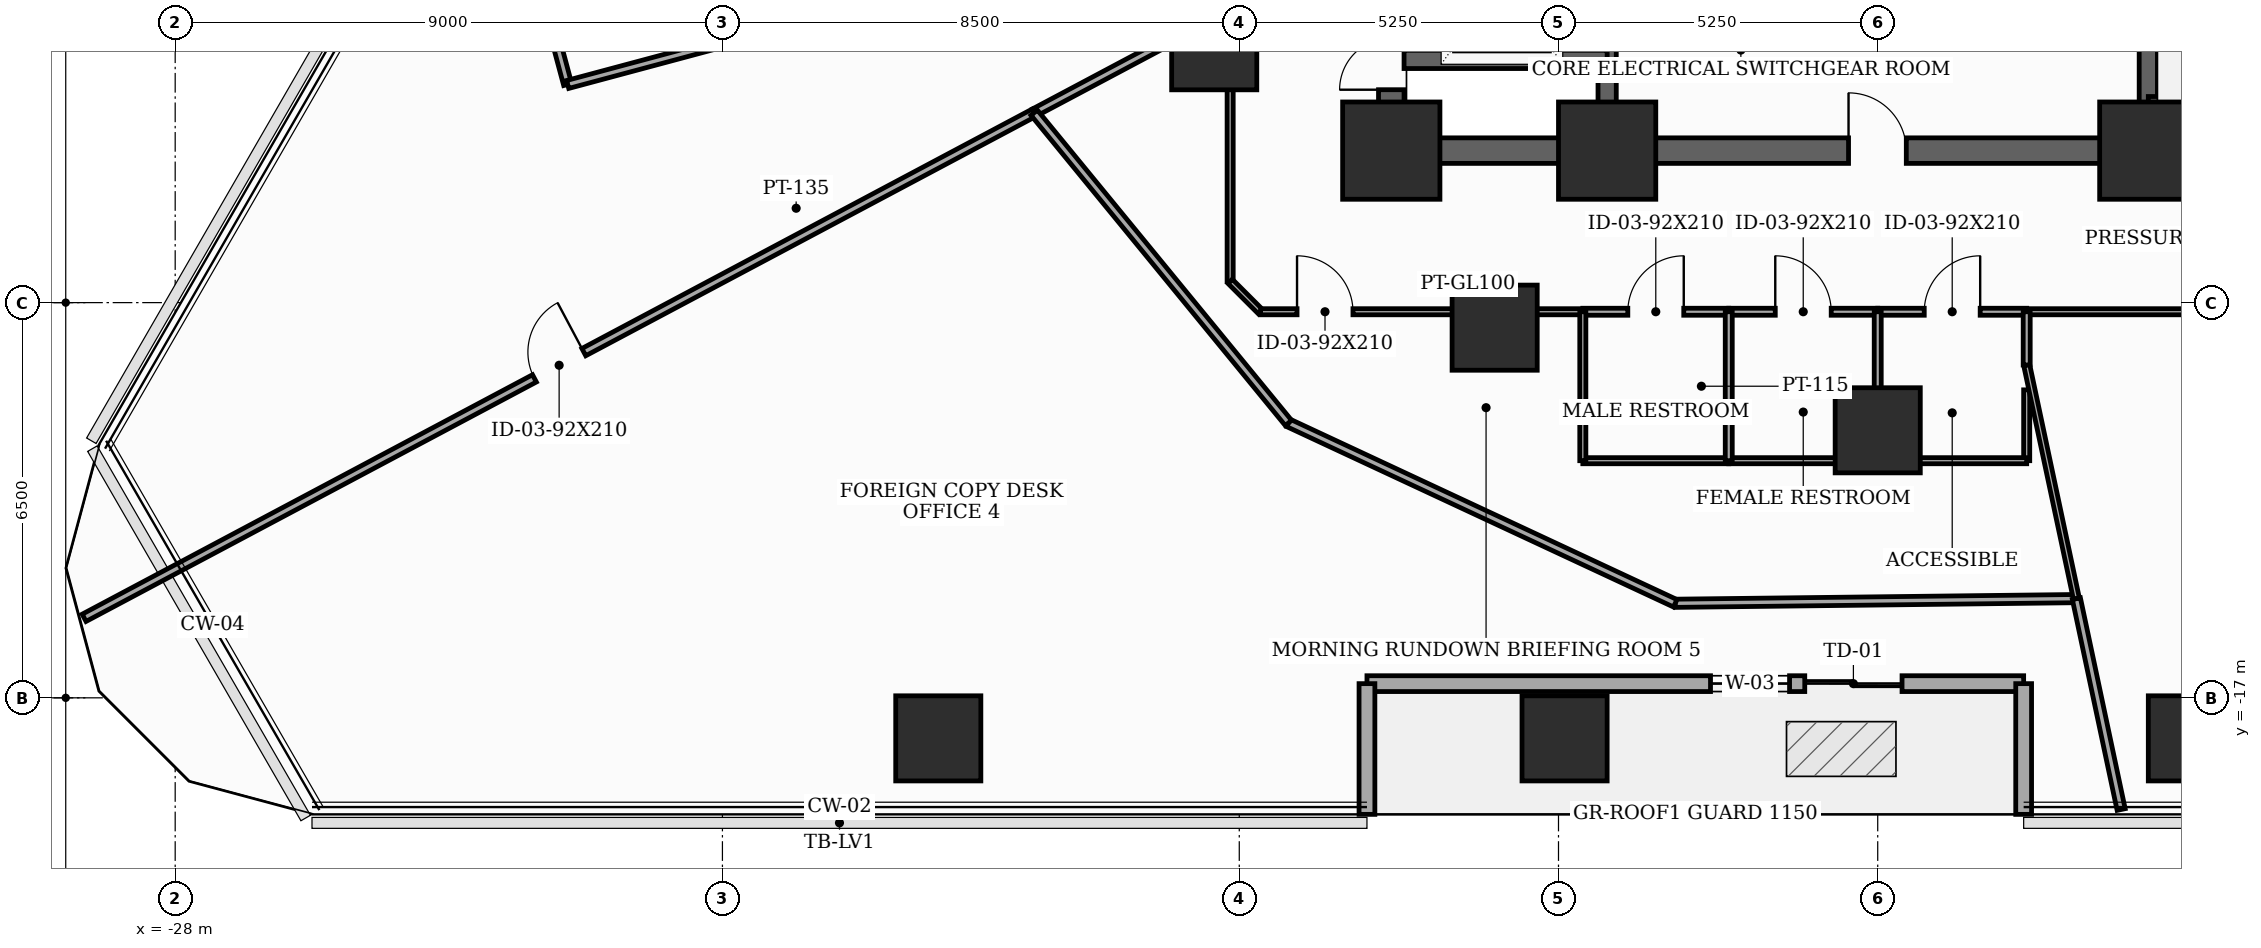
"""IFC4 building model, lengths in metres.
Left out: names, types, materials, properties, quantities, classifications, styles, units other than length and angle.
Written with IfcOpenShell. Run it as: python <this file> out.ifc"""

import sys

from ifc_helpers import new_model, si_unit, direction, frame, frame_2d, origin, origin_2d, place, context, subcontext, project, spatial, rectangle, extrude, element, fill, save


model = new_model("IFC4")
c1 = context("Model", 3, precision=1e-05, world=origin(), true_north=direction((0.0, 1.0)))
c2 = subcontext(c1, "Body", "Model", "MODEL_VIEW")
j1 = project(units=[si_unit("LENGTHUNIT", "METRE"), si_unit("PLANEANGLEUNIT", "RADIAN")], contexts=[c1])
p1 = place(None, origin())
s1 = spatial("IfcSite", under=j1, at=p1, CompositionType="ELEMENT")
p2 = place(p1, origin())
s2 = spatial("IfcBuilding", under=s1, at=p2, CompositionType="ELEMENT")
p3 = place(p2, frame((0.0, 0.0, 29.7)))
s3 = spatial("IfcBuildingStorey", under=s2, at=p3, CompositionType="ELEMENT", Elevation=29.7)
for number, where, z_axis, x_axis in (
    (1, (-8.0, -8.0, 0.0), (0.0, 0.0, 1.0), (1.0, 0.0, 0.0)),
    (2, (-4.45, -8.0, 0.0), (0.0, 0.0, 1.0), (1.0, 0.0, 0.0)),
    (3, (4.45, -8.0, 0.0), (0.0, 0.0, 1.0), (1.0, 0.0, 0.0)),
):
    element("IfcColumn", number, at=place(p3, frame(where, z_axis=z_axis, x_axis=x_axis)), inside=s3, PredefinedType="COLUMN", context=c2, shape_type="SweptSolid", body=[
        extrude(rectangle(XDim=1.6, YDim=1.6, at=origin_2d()), origin(), (0.0, 0.0, 1.0), 3.7),
    ])
for number, where, z_axis, x_axis in (
    (4, (-10.912, -6.3, 0.0), (0.0, 0.0, 1.0), (1.0, 0.0, 0.0)),
    (5, (-6.3, -10.912, 0.0), (0.0, 0.0, 1.0), (1.0, 0.0, 0.0)),
    (6, (0.0, -12.6, 0.0), (0.0, 0.0, 1.0), (1.0, 0.0, 0.0)),
    (7, (-15.45, -17.667, 0.0), (0.0, 0.0, 1.0), (1.0, 0.0, 0.0)),
    (8, (-5.15, -17.667, 0.0), (0.0, 0.0, 1.0), (1.0, 0.0, 0.0)),
    (9, (5.15, -17.667, 0.0), (0.0, 0.0, 1.0), (1.0, 0.0, 0.0)),
):
    element("IfcColumn", number, at=place(p3, frame(where, z_axis=z_axis, x_axis=x_axis)), inside=s3, PredefinedType="COLUMN", context=c2, shape_type="SweptSolid", body=[
        extrude(rectangle(XDim=1.4, YDim=1.4, at=origin_2d()), origin(), (0.0, 0.0, 1.0), 3.7),
    ])
p4 = place(p3, frame((-8.4, -16.767, 0.0), z_axis=(0.0, 0.0, 1.0), x_axis=(1.0, 0.0, 0.0)))
e10 = element("IfcWall", 10, at=p4, inside=s3, PredefinedType="SOLIDWALL", context=c2, shape_type="SweptSolid", body=[
    extrude(rectangle(XDim=10.8, YDim=0.26, at=frame_2d((5.4, 0.0))), origin(), (0.0, 0.0, 1.0), 3.5),
])
p5 = place(p4, frame((7.2, 0.0, 0.0)))
e11 = element("IfcOpeningElement", 11, at=p5, cuts=e10, PredefinedType="OPENING", context=c2, shape_type="SweptSolid", body=[
    extrude(rectangle(XDim=1.6, YDim=2.08, at=frame_2d((0.8, 1.04))), frame((0.0, 0.14, 0.0), z_axis=(0.0, -1.0, 0.0), x_axis=(1.0, 0.0, 0.0)), (0.0, 0.0, 1.0), 0.28),
])
p6 = place(p4, frame((5.65, 0.0, 0.85)))
e12 = element("IfcOpeningElement", 12, at=p6, cuts=e10, PredefinedType="OPENING", context=c2, shape_type="SweptSolid", body=[
    extrude(rectangle(XDim=1.3, YDim=1.25, at=frame_2d((0.65, 0.625))), frame((0.0, 0.14, 0.0), z_axis=(0.0, -1.0, 0.0), x_axis=(1.0, 0.0, 0.0)), (0.0, 0.0, 1.0), 0.28),
])
for number, where, z_axis, x_axis in (
    (13, (-8.4, -18.917, 0.0), (0.0, 0.0, 1.0), (0.0, 1.0, 0.0)),
    (14, (2.4, -16.767, 0.0), (0.0, 0.0, 1.0), (0.0, -1.0, 0.0)),
):
    element("IfcWall", number, at=place(p3, frame(where, z_axis=z_axis, x_axis=x_axis)), inside=s3, PredefinedType="SOLIDWALL", context=c2, shape_type="SweptSolid", body=[
        extrude(rectangle(XDim=2.15, YDim=0.26, at=frame_2d((1.075, 0.0))), origin(), (0.0, 0.0, 1.0), 3.5),
    ])
p7 = place(p3, frame((-8.0, -8.0, 0.0), z_axis=(0.0, 0.0, 1.0), x_axis=(0.0, 1.0, 0.0)))
e15 = element("IfcWall", 15, at=p7, inside=s3, PredefinedType="SHEAR", context=c2, shape_type="SweptSolid", body=[
    extrude(rectangle(XDim=16.0, YDim=0.42, at=frame_2d((8.0, 0.0))), origin(), (0.0, 0.0, 1.0), 3.5),
])
p8 = place(p7, frame((1.002, 0.0, 0.0)))
e16 = element("IfcOpeningElement", 16, at=p8, cuts=e15, PredefinedType="OPENING", context=c2, shape_type="SweptSolid", body=[
    extrude(rectangle(XDim=0.85, YDim=2.02, at=frame_2d((0.425, 1.01))), frame((0.0, 0.22, 0.0), z_axis=(0.0, -1.0, 0.0), x_axis=(1.0, 0.0, 0.0)), (0.0, 0.0, 1.0), 0.44),
])
p9 = place(p7, frame((5.35, 0.0, 0.0)))
e17 = element("IfcOpeningElement", 17, at=p9, cuts=e15, PredefinedType="OPENING", context=c2, shape_type="SweptSolid", body=[
    extrude(rectangle(XDim=1.05, YDim=2.15, at=frame_2d((0.525, 1.075))), frame((0.0, 0.22, 0.0), z_axis=(0.0, -1.0, 0.0), x_axis=(1.0, 0.0, 0.0)), (0.0, 0.0, 1.0), 0.44),
])
p10 = place(p3, frame((-8.0, -8.0, 0.0), z_axis=(0.0, 0.0, 1.0), x_axis=(1.0, 0.0, 0.0)))
e18 = element("IfcWall", 18, at=p10, inside=s3, PredefinedType="SHEAR", context=c2, shape_type="SweptSolid", body=[
    extrude(rectangle(XDim=16.0, YDim=0.42, at=frame_2d((8.0, 0.0))), origin(), (0.0, 0.0, 1.0), 3.5),
])
p11 = place(p10, frame((7.52, 0.0, 0.0)))
e19 = element("IfcOpeningElement", 19, at=p11, cuts=e18, PredefinedType="OPENING", context=c2, shape_type="SweptSolid", body=[
    extrude(rectangle(XDim=0.95, YDim=2.1, at=frame_2d((0.475, 1.05))), frame((0.0, 0.22, 0.0), z_axis=(0.0, -1.0, 0.0), x_axis=(1.0, 0.0, 0.0)), (0.0, 0.0, 1.0), 0.44),
])
for number, where, z_axis, x_axis in (
    (20, (-4.45, -7.79, 0.0), (0.0, 0.0, 1.0), (0.0, 1.0, 0.0)),
    (21, (4.45, -7.79, 0.0), (0.0, 0.0, 1.0), (0.0, 1.0, 0.0)),
):
    element("IfcWall", number, at=place(p3, frame(where, z_axis=z_axis, x_axis=x_axis)), inside=s3, PredefinedType="SHEAR", context=c2, shape_type="SweptSolid", body=[
        extrude(rectangle(XDim=15.58, YDim=0.3, at=frame_2d((7.79, 0.0))), origin(), (0.0, 0.0, 1.0), 3.5),
    ])
p12 = place(p3, frame((4.45, -7.26, 0.0), z_axis=(0.0, 0.0, 1.0), x_axis=(1.0, 0.0, 0.0)))
e22 = element("IfcWall", 22, at=p12, inside=s3, PredefinedType="SHEAR", context=c2, shape_type="SweptSolid", body=[
    extrude(rectangle(XDim=3.55, YDim=0.3, at=frame_2d((1.775, 0.0))), origin(), (0.0, 0.0, 1.0), 3.5),
])
p13 = place(p3, frame((-7.79, -6.5, 0.0), z_axis=(0.0, 0.0, 1.0), x_axis=(1.0, 0.0, 0.0)))
e23 = element("IfcWall", 23, at=p13, inside=s3, PredefinedType="SHEAR", context=c2, shape_type="SweptSolid", body=[
    extrude(rectangle(XDim=3.34, YDim=0.3, at=frame_2d((1.67, 0.0))), origin(), (0.0, 0.0, 1.0), 3.5),
])
p14 = place(p3, frame((-22.115, -4.787, 0.0), z_axis=(0.0, 0.0, 1.0), x_axis=(0.259105843213, -0.965848933329, 0.0)))
e24 = element("IfcWall", 24, at=p14, inside=s3, PredefinedType="PARTITIONING", context=c2, shape_type="SweptSolid", body=[
    extrude(rectangle(XDim=2.2, YDim=0.135, at=frame_2d((1.1, 0.0))), origin(), (0.0, 0.0, 1.0), 2.935),
])
p15 = place(p3, frame((-21.545, -6.912, 0.0), z_axis=(0.0, 0.0, 1.0), x_axis=(0.965906888357, 0.258889712088, 0.0)))
e25 = element("IfcWall", 25, at=p15, inside=s3, PredefinedType="PARTITIONING", context=c2, shape_type="SweptSolid", body=[
    extrude(rectangle(XDim=11.28, YDim=0.135, at=frame_2d((5.64, 0.0))), origin(), (0.0, 0.0, 1.0), 2.785),
])
p16 = place(p3, frame((-10.65, -5.663, 0.0), z_axis=(0.0, 0.0, 1.0), x_axis=(0.0, -1.0, 0.0)))
e26 = element("IfcWall", 26, at=p16, inside=s3, PredefinedType="MOVABLE", context=c2, shape_type="SweptSolid", body=[
    extrude(rectangle(XDim=4.487, YDim=0.1, at=frame_2d((2.243, 0.0))), origin(), (0.0, 0.0, 1.0), 2.785),
])
p17 = place(p3, frame((-10.65, -10.15, 0.0), z_axis=(0.0, 0.0, 1.0), x_axis=(0.707106781187, -0.707106781187, 0.0)))
e27 = element("IfcWall", 27, at=p17, inside=s3, PredefinedType="MOVABLE", context=c2, shape_type="SweptSolid", body=[
    extrude(rectangle(XDim=0.707, YDim=0.1, at=frame_2d((0.354, 0.0))), origin(), (0.0, 0.0, 1.0), 3.5),
])
p18 = place(p3, frame((-10.15, -10.65, 0.0), z_axis=(0.0, 0.0, 1.0), x_axis=(1.0, 0.0, 0.0)))
e28 = element("IfcWall", 28, at=p18, inside=s3, PredefinedType="MOVABLE", context=c2, shape_type="SweptSolid", body=[
    extrude(rectangle(XDim=5.3, YDim=0.1, at=frame_2d((2.65, 0.0))), origin(), (0.0, 0.0, 1.0), 2.785),
])
p19 = place(p18, frame((0.6, 0.0, 0.0)))
e29 = element("IfcOpeningElement", 29, at=p19, cuts=e28, PredefinedType="OPENING", context=c2, shape_type="SweptSolid", body=[
    extrude(rectangle(XDim=0.92, YDim=2.1, at=frame_2d((0.46, 1.05))), frame((0.0, 0.06, 0.0), z_axis=(0.0, -1.0, 0.0), x_axis=(1.0, 0.0, 0.0)), (0.0, 0.0, 1.0), 0.12),
])
p20 = place(p3, frame((-4.85, -10.65, 0.0), z_axis=(0.0, 0.0, 1.0), x_axis=(1.0, 0.0, 0.0)))
e30 = element("IfcWall", 30, at=p20, inside=s3, PredefinedType="PARTITIONING", context=c2, shape_type="SweptSolid", body=[
    extrude(rectangle(XDim=2.4, YDim=0.115, at=frame_2d((1.2, 0.0))), origin(), (0.0, 0.0, 1.0), 3.5),
])
p21 = place(p20, frame((0.74, 0.0, 0.0)))
e31 = element("IfcOpeningElement", 31, at=p21, cuts=e30, PredefinedType="OPENING", context=c2, shape_type="SweptSolid", body=[
    extrude(rectangle(XDim=0.92, YDim=2.1, at=frame_2d((0.46, 1.05))), frame((0.0, 0.067, 0.0), z_axis=(0.0, -1.0, 0.0), x_axis=(1.0, 0.0, 0.0)), (0.0, 0.0, 1.0), 0.135),
])
p22 = place(p3, frame((-2.45, -10.65, 0.0), z_axis=(0.0, 0.0, 1.0), x_axis=(1.0, 0.0, 0.0)))
e32 = element("IfcWall", 32, at=p22, inside=s3, PredefinedType="PARTITIONING", context=c2, shape_type="SweptSolid", body=[
    extrude(rectangle(XDim=2.45, YDim=0.115, at=frame_2d((1.225, 0.0))), origin(), (0.0, 0.0, 1.0), 2.785),
])
p23 = place(p22, frame((0.765, 0.0, 0.0)))
e33 = element("IfcOpeningElement", 33, at=p23, cuts=e32, PredefinedType="OPENING", context=c2, shape_type="SweptSolid", body=[
    extrude(rectangle(XDim=0.92, YDim=2.1, at=frame_2d((0.46, 1.05))), frame((0.0, 0.067, 0.0), z_axis=(0.0, -1.0, 0.0), x_axis=(1.0, 0.0, 0.0)), (0.0, 0.0, 1.0), 0.135),
])
p24 = place(p3, frame((0.0, -10.65, 0.0), z_axis=(0.0, 0.0, 1.0), x_axis=(1.0, 0.0, 0.0)))
e34 = element("IfcWall", 34, at=p24, inside=s3, PredefinedType="PARTITIONING", context=c2, shape_type="SweptSolid", body=[
    extrude(rectangle(XDim=2.45, YDim=0.115, at=frame_2d((1.225, 0.0))), origin(), (0.0, 0.0, 1.0), 3.5),
])
p25 = place(p24, frame((0.765, 0.0, 0.0)))
e35 = element("IfcOpeningElement", 35, at=p25, cuts=e34, PredefinedType="OPENING", context=c2, shape_type="SweptSolid", body=[
    extrude(rectangle(XDim=0.92, YDim=2.1, at=frame_2d((0.46, 1.05))), frame((0.0, 0.067, 0.0), z_axis=(0.0, -1.0, 0.0), x_axis=(1.0, 0.0, 0.0)), (0.0, 0.0, 1.0), 0.135),
])
p26 = place(p3, frame((2.45, -10.65, 0.0), z_axis=(0.0, 0.0, 1.0), x_axis=(1.0, 0.0, 0.0)))
e36 = element("IfcWall", 36, at=p26, inside=s3, PredefinedType="MOVABLE", context=c2, shape_type="SweptSolid", body=[
    extrude(rectangle(XDim=7.7, YDim=0.1, at=frame_2d((3.85, 0.0))), origin(), (0.0, 0.0, 1.0), 2.785),
])
p27 = place(p3, frame((-29.498, -15.684, 0.0), z_axis=(0.0, 0.0, 1.0), x_axis=(0.882944182352, 0.46947797696, 0.0)))
e37 = element("IfcWall", 37, at=p27, inside=s3, PredefinedType="PARTITIONING", context=c2, shape_type="SweptSolid", body=[
    extrude(rectangle(XDim=17.697, YDim=0.135, at=frame_2d((8.848, 0.0))), origin(), (0.0, 0.0, 1.0), 2.935),
])
p28 = place(p27, frame((8.388, 0.0, 0.0)))
e38 = element("IfcOpeningElement", 38, at=p28, cuts=e37, PredefinedType="OPENING", context=c2, shape_type="SweptSolid", body=[
    extrude(rectangle(XDim=0.92, YDim=2.1, at=frame_2d((0.46, 1.05))), frame((0.0, 0.077, 0.0), z_axis=(0.0, -1.0, 0.0), x_axis=(1.0, 0.0, 0.0)), (0.0, 0.0, 1.0), 0.155),
])
p29 = place(p3, frame((-13.873, -7.376, 0.0), z_axis=(0.0, 0.0, 1.0), x_axis=(0.883048160598, 0.469282373486, 0.0)))
e39 = element("IfcWall", 39, at=p29, inside=s3, PredefinedType="PARTITIONING", context=c2, shape_type="SweptSolid", body=[
    extrude(rectangle(XDim=3.65, YDim=0.135, at=frame_2d((1.825, 0.0))), origin(), (0.0, 0.0, 1.0), 2.785),
])
p30 = place(p3, frame((3.267, -15.368, 0.0), z_axis=(0.0, 0.0, 1.0), x_axis=(-0.999931630146, -0.011693375588, 0.0)))
e40 = element("IfcWall", 40, at=p30, inside=s3, PredefinedType="PARTITIONING", context=c2, shape_type="SweptSolid", body=[
    extrude(rectangle(XDim=6.598, YDim=0.135, at=frame_2d((3.299, 0.0))), origin(), (0.0, 0.0, 1.0), 3.5),
])
p31 = place(p3, frame((-3.33, -15.445, 0.0), z_axis=(0.0, 0.0, 1.0), x_axis=(-0.90631018164, 0.422613126458, 0.0)))
e41 = element("IfcWall", 41, at=p31, inside=s3, PredefinedType="PARTITIONING", context=c2, shape_type="SweptSolid", body=[
    extrude(rectangle(XDim=7.018, YDim=0.135, at=frame_2d((3.509, 0.0))), origin(), (0.0, 0.0, 1.0), 2.685),
])
p32 = place(p3, frame((-9.691, -12.479, 0.0), z_axis=(0.0, 0.0, 1.0), x_axis=(-0.633866270814, 0.773442661562, 0.0)))
e42 = element("IfcWall", 42, at=p32, inside=s3, PredefinedType="PARTITIONING", context=c2, shape_type="SweptSolid", body=[
    extrude(rectangle(XDim=6.598, YDim=0.135, at=frame_2d((3.299, 0.0))), origin(), (0.0, 0.0, 1.0), 3.5),
])
p33 = place(p3, frame((4.003, -18.837, 0.0), z_axis=(0.0, 0.0, 1.0), x_axis=(-0.207633969896, 0.978206590933, 0.0)))
e43 = element("IfcWall", 43, at=p33, inside=s3, PredefinedType="PARTITIONING", context=c2, shape_type="SweptSolid", body=[
    extrude(rectangle(XDim=3.546, YDim=0.135, at=frame_2d((1.773, 0.0))), origin(), (0.0, 0.0, 1.0), 2.935),
])
p34 = place(p3, frame((-2.45, -13.1, 0.0), z_axis=(0.0, 0.0, 1.0), x_axis=(-1.0, 0.0, 0.0)))
e44 = element("IfcWall", 44, at=p34, inside=s3, PredefinedType="MOVABLE", context=c2, shape_type="SweptSolid", body=[
    extrude(rectangle(XDim=2.4, YDim=0.1, at=frame_2d((1.2, 0.0))), origin(), (0.0, 0.0, 1.0), 3.5),
])
p35 = place(p3, frame((-4.85, -13.1, 0.0), z_axis=(0.0, 0.0, 1.0), x_axis=(0.0, 1.0, 0.0)))
e45 = element("IfcWall", 45, at=p35, inside=s3, PredefinedType="MOVABLE", context=c2, shape_type="SweptSolid", body=[
    extrude(rectangle(XDim=2.45, YDim=0.1, at=frame_2d((1.225, 0.0))), origin(), (0.0, 0.0, 1.0), 2.785),
])
p36 = place(p3, frame((0.0, -13.1, 0.0), z_axis=(0.0, 0.0, 1.0), x_axis=(-1.0, 0.0, 0.0)))
e46 = element("IfcWall", 46, at=p36, inside=s3, PredefinedType="MOVABLE", context=c2, shape_type="SweptSolid", body=[
    extrude(rectangle(XDim=2.45, YDim=0.1, at=frame_2d((1.225, 0.0))), origin(), (0.0, 0.0, 1.0), 3.5),
])
p37 = place(p3, frame((2.45, -11.935, 0.0), z_axis=(0.0, 0.0, 1.0), x_axis=(0.0, -1.0, 0.0)))
e47 = element("IfcWall", 47, at=p37, inside=s3, PredefinedType="MOVABLE", context=c2, shape_type="SweptSolid", body=[
    extrude(rectangle(XDim=1.166, YDim=0.1, at=frame_2d((0.583, 0.0))), origin(), (0.0, 0.0, 1.0), 2.785),
])
p38 = place(p3, frame((2.45, -13.1, 0.0), z_axis=(0.0, 0.0, 1.0), x_axis=(-1.0, 0.0, 0.0)))
e48 = element("IfcWall", 48, at=p38, inside=s3, PredefinedType="MOVABLE", context=c2, shape_type="SweptSolid", body=[
    extrude(rectangle(XDim=2.45, YDim=0.1, at=frame_2d((1.225, 0.0))), origin(), (0.0, 0.0, 1.0), 3.5),
])
p39 = place(p3, frame((3.267, -15.368, 0.0), z_axis=(0.0, 0.0, 1.0), x_axis=(-0.208030469109, 0.978122346091, 0.0)))
e49 = element("IfcWall", 49, at=p39, inside=s3, PredefinedType="MOVABLE", context=c2, shape_type="SweptSolid", body=[
    extrude(rectangle(XDim=3.928, YDim=0.1, at=frame_2d((1.964, 0.0))), origin(), (0.0, 0.0, 1.0), 2.785),
])
for number, where, z_axis, x_axis in (
    (50, (-2.45, -13.1, 0.0), (0.0, 0.0, 1.0), (0.0, 1.0, 0.0)),
    (51, (0.0, -13.1, 0.0), (0.0, 0.0, 1.0), (0.0, 1.0, 0.0)),
):
    element("IfcWall", number, at=place(p3, frame(where, z_axis=z_axis, x_axis=x_axis)), inside=s3, PredefinedType="PARTITIONING", context=c2, shape_type="SweptSolid", body=[
        extrude(rectangle(XDim=2.45, YDim=0.115, at=frame_2d((1.225, 0.0))), origin(), (0.0, 0.0, 1.0), 2.785),
    ])
p40 = place(p3, frame((2.45, -11.526, 0.0), z_axis=(0.0, 0.0, 1.0), x_axis=(0.0, 1.0, 0.0)))
e52 = element("IfcWall", 52, at=p40, inside=s3, PredefinedType="PARTITIONING", context=c2, shape_type="SweptSolid", body=[
    extrude(rectangle(XDim=0.876, YDim=0.115, at=frame_2d((0.438, 0.0))), origin(), (0.0, 0.0, 1.0), 3.5),
])
p41 = place(p5, frame((1.6, 0.0, 0.0), z_axis=(0.0, 0.0, 1.0), x_axis=(-1.0, 0.0, 0.0)))
e53 = element("IfcDoor", 53, at=p41, inside=s3, OperationType="DOUBLE_DOOR_SLIDING", PredefinedType="DOOR", context=c2, shape_type="SweptSolid", body=[
    extrude(rectangle(XDim=1.6, YDim=2.08, at=frame_2d((0.8, 1.04))), frame((0.0, 0.025, 0.0), z_axis=(0.0, -1.0, 0.0), x_axis=(1.0, 0.0, 0.0)), (0.0, 0.0, 1.0), 0.05),
])
fill(e11, e53)
p42 = place(p6, origin())
e54 = element("IfcWindow", 54, at=p42, inside=s3, PartitioningType="SINGLE_PANEL", PredefinedType="WINDOW", context=c2, shape_type="SweptSolid", body=[
    extrude(rectangle(XDim=1.3, YDim=1.25, at=frame_2d((0.65, 0.625))), frame((0.0, 0.03, 0.0), z_axis=(0.0, -1.0, 0.0), x_axis=(1.0, 0.0, 0.0)), (0.0, 0.0, 1.0), 0.06),
])
fill(e12, e54)
p43 = place(p8, origin())
e55 = element("IfcDoor", 55, at=p43, inside=s3, OperationType="SINGLE_SWING_LEFT", PredefinedType="TRAPDOOR", context=c2, shape_type="SweptSolid", body=[
    extrude(rectangle(XDim=0.85, YDim=2.02, at=frame_2d((0.425, 1.01))), frame((0.0, 0.025, 0.0), z_axis=(0.0, -1.0, 0.0), x_axis=(1.0, 0.0, 0.0)), (0.0, 0.0, 1.0), 0.05),
])
fill(e16, e55)
p44 = place(p11, origin())
e56 = element("IfcDoor", 56, at=p44, inside=s3, OperationType="SINGLE_SWING_LEFT", PredefinedType="DOOR", context=c2, shape_type="SweptSolid", body=[
    extrude(rectangle(XDim=0.95, YDim=2.1, at=frame_2d((0.475, 1.05))), frame((0.0, 0.025, 0.0), z_axis=(0.0, -1.0, 0.0), x_axis=(1.0, 0.0, 0.0)), (0.0, 0.0, 1.0), 0.05),
])
fill(e19, e56)
p45 = place(p19, origin())
e57 = element("IfcDoor", 57, at=p45, inside=s3, OperationType="SINGLE_SWING_LEFT", PredefinedType="DOOR", context=c2, shape_type="SweptSolid", body=[
    extrude(rectangle(XDim=0.92, YDim=2.1, at=frame_2d((0.46, 1.05))), frame((0.0, 0.025, 0.0), z_axis=(0.0, -1.0, 0.0), x_axis=(1.0, 0.0, 0.0)), (0.0, 0.0, 1.0), 0.05),
])
fill(e29, e57)
p46 = place(p21, origin())
e58 = element("IfcDoor", 58, at=p46, inside=s3, OperationType="SINGLE_SWING_RIGHT", PredefinedType="DOOR", context=c2, shape_type="SweptSolid", body=[
    extrude(rectangle(XDim=0.92, YDim=2.1, at=frame_2d((0.46, 1.05))), frame((0.0, 0.025, 0.0), z_axis=(0.0, -1.0, 0.0), x_axis=(1.0, 0.0, 0.0)), (0.0, 0.0, 1.0), 0.05),
])
fill(e31, e58)
p47 = place(p23, origin())
e59 = element("IfcDoor", 59, at=p47, inside=s3, OperationType="SINGLE_SWING_LEFT", PredefinedType="DOOR", context=c2, shape_type="SweptSolid", body=[
    extrude(rectangle(XDim=0.92, YDim=2.1, at=frame_2d((0.46, 1.05))), frame((0.0, 0.025, 0.0), z_axis=(0.0, -1.0, 0.0), x_axis=(1.0, 0.0, 0.0)), (0.0, 0.0, 1.0), 0.05),
])
fill(e33, e59)
p48 = place(p25, origin())
e60 = element("IfcDoor", 60, at=p48, inside=s3, OperationType="SINGLE_SWING_RIGHT", PredefinedType="DOOR", context=c2, shape_type="SweptSolid", body=[
    extrude(rectangle(XDim=0.92, YDim=2.1, at=frame_2d((0.46, 1.05))), frame((0.0, 0.025, 0.0), z_axis=(0.0, -1.0, 0.0), x_axis=(1.0, 0.0, 0.0)), (0.0, 0.0, 1.0), 0.05),
])
fill(e35, e60)
p49 = place(p28, origin())
e61 = element("IfcDoor", 61, at=p49, inside=s3, OperationType="SINGLE_SWING_RIGHT", PredefinedType="DOOR", context=c2, shape_type="SweptSolid", body=[
    extrude(rectangle(XDim=0.92, YDim=2.1, at=frame_2d((0.46, 1.05))), frame((0.0, 0.025, 0.0), z_axis=(0.0, -1.0, 0.0), x_axis=(1.0, 0.0, 0.0)), (0.0, 0.0, 1.0), 0.05),
])
fill(e38, e61)
save(model, sys.argv[1])
